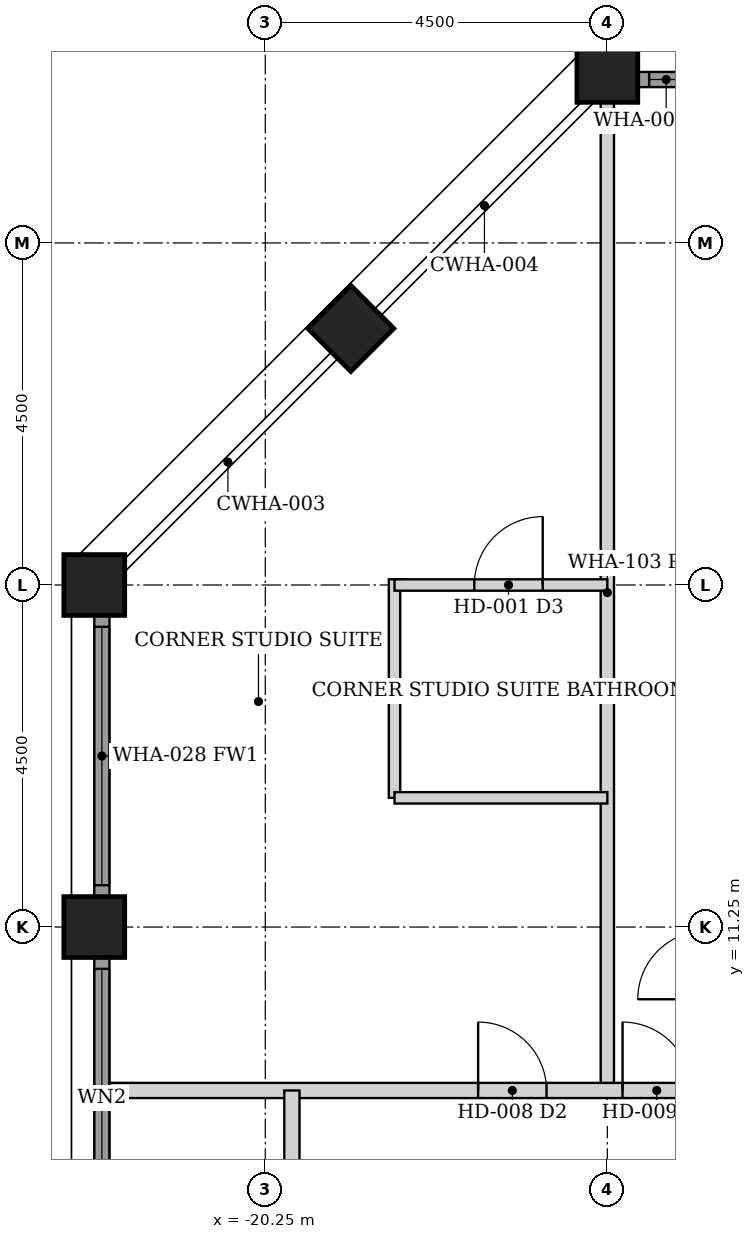
"""IFC4 building model, lengths in metres.
Left out: names, types, materials, properties, quantities, classifications, styles, units other than length and angle.
Written with IfcOpenShell. Run it as: python <this file> out.ifc"""

import sys

from ifc_helpers import new_model, si_unit, direction, frame, frame_2d, origin, origin_2d, place, context, subcontext, project, spatial, rectangle, hollow_rectangle, extrude, element, fill, save


model = new_model("IFC4")
c1 = context("Model", 3, precision=1e-05, world=origin(), true_north=direction((0.0, 1.0)))
c2 = subcontext(c1, "Body", "Model", "MODEL_VIEW")
j1 = project(units=[si_unit("LENGTHUNIT", "METRE"), si_unit("PLANEANGLEUNIT", "RADIAN")], contexts=[c1])
p1 = place(None, origin())
s1 = spatial("IfcSite", under=j1, at=p1, CompositionType="ELEMENT")
p2 = place(p1, origin())
s2 = spatial("IfcBuilding", under=s1, at=p2, CompositionType="ELEMENT")
p3 = place(p2, frame((0.0, 0.0, 150.8)))
s3 = spatial("IfcBuildingStorey", under=s2, at=p3, CompositionType="ELEMENT", Elevation=150.8)
for number, where, z_axis, x_axis in (
    (1, (-15.75, 22.5, 0.0), (0.0, 0.0, 1.0), (0.0, 1.0, 0.0)),
    (2, (-22.5, 11.25, 0.0), (0.0, 0.0, 1.0), (1.0, 0.0, 0.0)),
    (3, (-22.5, 15.75, 0.0), (0.0, 0.0, 1.0), (1.0, 0.0, 0.0)),
    (4, (-19.125, 19.125, 0.0), (0.0, 0.0, 1.0), (0.707, -0.707, 0.0)),
):
    element("IfcColumn", number, at=place(p3, frame(where, z_axis=z_axis, x_axis=x_axis)), inside=s3, PredefinedType="COLUMN", context=c2, shape_type="SweptSolid", body=[
        extrude(hollow_rectangle(XDim=0.8, YDim=0.8, WallThickness=0.05, at=origin_2d()), origin(), (0.0, 0.0, 1.0), 3.6),
    ])
p4 = place(p3, frame((-15.345, 22.4, 0.0), z_axis=(0.0, 0.0, 1.0), x_axis=(1.0, 0.0, 0.0)))
e5 = element("IfcWall", 5, at=p4, inside=s3, PredefinedType="SOLIDWALL", context=c2, shape_type="SweptSolid", body=[
    extrude(rectangle(XDim=3.69, YDim=0.2, at=frame_2d((1.845, 0.0))), origin(), (0.0, 0.0, 1.0), 2.479),
])
p5 = place(p4, frame((0.145, 0.0, 0.3)))
e6 = element("IfcOpeningElement", 6, at=p5, cuts=e5, PredefinedType="OPENING", context=c2, shape_type="SweptSolid", body=[
    extrude(rectangle(XDim=3.4, YDim=2.029, at=frame_2d((1.7, 1.015))), frame((0.0, 0.11, 0.0), z_axis=(0.0, -1.0, 0.0), x_axis=(1.0, 0.0, 0.0)), (0.0, 0.0, 1.0), 0.22),
])
p6 = place(p3, frame((-22.4, 7.155, 0.0), z_axis=(0.0, 0.0, 1.0), x_axis=(0.0, 1.0, 0.0)))
e7 = element("IfcWall", 7, at=p6, inside=s3, PredefinedType="SOLIDWALL", context=c2, shape_type="SweptSolid", body=[
    extrude(rectangle(XDim=3.69, YDim=0.2, at=frame_2d((1.845, 0.0))), origin(), (0.0, 0.0, 1.0), 2.479),
])
p7 = place(p6, frame((0.145, 0.0, 0.3)))
e8 = element("IfcOpeningElement", 8, at=p7, cuts=e7, PredefinedType="OPENING", context=c2, shape_type="SweptSolid", body=[
    extrude(rectangle(XDim=3.4, YDim=2.029, at=frame_2d((1.7, 1.015))), frame((0.0, 0.11, 0.0), z_axis=(0.0, -1.0, 0.0), x_axis=(1.0, 0.0, 0.0)), (0.0, 0.0, 1.0), 0.22),
])
p8 = place(p3, frame((-22.4, 11.655, 0.0), z_axis=(0.0, 0.0, 1.0), x_axis=(0.0, 1.0, 0.0)))
e9 = element("IfcWall", 9, at=p8, inside=s3, PredefinedType="SOLIDWALL", context=c2, shape_type="SweptSolid", body=[
    extrude(rectangle(XDim=3.69, YDim=0.2, at=frame_2d((1.845, 0.0))), origin(), (0.0, 0.0, 1.0), 2.479),
])
p9 = place(p8, frame((0.145, 0.0, 0.3)))
e10 = element("IfcOpeningElement", 10, at=p9, cuts=e9, PredefinedType="OPENING", context=c2, shape_type="SweptSolid", body=[
    extrude(rectangle(XDim=3.4, YDim=2.029, at=frame_2d((1.7, 1.015))), frame((0.0, 0.11, 0.0), z_axis=(0.0, -1.0, 0.0), x_axis=(1.0, 0.0, 0.0)), (0.0, 0.0, 1.0), 0.22),
])
p10 = place(p3, frame((-22.3, 9.1, 0.0), z_axis=(0.0, 0.0, 1.0), x_axis=(1.0, 0.0, 0.0)))
e11 = element("IfcWall", 11, at=p10, inside=s3, PredefinedType="PARTITIONING", context=c2, shape_type="SweptSolid", body=[
    extrude(rectangle(XDim=44.6, YDim=0.2, at=frame_2d((22.3, 0.0))), origin(), (0.0, 0.0, 1.0), 2.473),
])
p11 = place(p10, frame((6.75, 0.0, 0.0)))
e12 = element("IfcOpeningElement", 12, at=p11, cuts=e11, PredefinedType="OPENING", context=c2, shape_type="SweptSolid", body=[
    extrude(rectangle(XDim=0.9, YDim=2.1, at=frame_2d((0.45, 1.05))), frame((0.0, 0.11, 0.0), z_axis=(0.0, -1.0, 0.0), x_axis=(1.0, 0.0, 0.0)), (0.0, 0.0, 1.0), 0.22),
])
p12 = place(p10, frame((11.25, 0.0, 0.0)))
e13 = element("IfcOpeningElement", 13, at=p12, cuts=e11, PredefinedType="OPENING", context=c2, shape_type="SweptSolid", body=[
    extrude(rectangle(XDim=0.9, YDim=2.1, at=frame_2d((0.45, 1.05))), frame((0.0, 0.11, 0.0), z_axis=(0.0, -1.0, 0.0), x_axis=(1.0, 0.0, 0.0)), (0.0, 0.0, 1.0), 0.22),
])
p13 = place(p10, frame((23.45, 0.0, 0.0)))
e14 = element("IfcOpeningElement", 14, at=p13, cuts=e11, PredefinedType="OPENING", context=c2, shape_type="SweptSolid", body=[
    extrude(rectangle(XDim=0.9, YDim=2.1, at=frame_2d((0.45, 1.05))), frame((0.0, 0.11, 0.0), z_axis=(0.0, -1.0, 0.0), x_axis=(1.0, 0.0, 0.0)), (0.0, 0.0, 1.0), 0.22),
])
p14 = place(p10, frame((32.45, 0.0, 0.0)))
e15 = element("IfcOpeningElement", 15, at=p14, cuts=e11, PredefinedType="OPENING", context=c2, shape_type="SweptSolid", body=[
    extrude(rectangle(XDim=0.9, YDim=2.1, at=frame_2d((0.45, 1.05))), frame((0.0, 0.11, 0.0), z_axis=(0.0, -1.0, 0.0), x_axis=(1.0, 0.0, 0.0)), (0.0, 0.0, 1.0), 0.22),
])
p15 = place(p10, frame((33.75, 0.0, 0.0)))
e16 = element("IfcOpeningElement", 16, at=p15, cuts=e11, PredefinedType="OPENING", context=c2, shape_type="SweptSolid", body=[
    extrude(rectangle(XDim=0.9, YDim=2.1, at=frame_2d((0.45, 1.05))), frame((0.0, 0.11, 0.0), z_axis=(0.0, -1.0, 0.0), x_axis=(1.0, 0.0, 0.0)), (0.0, 0.0, 1.0), 0.22),
])
p16 = place(p10, frame((38.85, 0.0, 0.0)))
e17 = element("IfcOpeningElement", 17, at=p16, cuts=e11, PredefinedType="OPENING", context=c2, shape_type="SweptSolid", body=[
    extrude(rectangle(XDim=0.9, YDim=2.1, at=frame_2d((0.45, 1.05))), frame((0.0, 0.11, 0.0), z_axis=(0.0, -1.0, 0.0), x_axis=(1.0, 0.0, 0.0)), (0.0, 0.0, 1.0), 0.22),
])
p17 = place(p10, frame((4.85, 0.0, 0.0)))
e18 = element("IfcOpeningElement", 18, at=p17, cuts=e11, PredefinedType="OPENING", context=c2, shape_type="SweptSolid", body=[
    extrude(rectangle(XDim=0.9, YDim=2.1, at=frame_2d((0.45, 1.05))), frame((0.0, 0.11, 0.0), z_axis=(0.0, -1.0, 0.0), x_axis=(1.0, 0.0, 0.0)), (0.0, 0.0, 1.0), 0.22),
])
p18 = place(p3, frame((-19.9, -9.1, 0.0), z_axis=(0.0, 0.0, 1.0), x_axis=(0.0, 1.0, 0.0)))
e19 = element("IfcWall", 19, at=p18, inside=s3, PredefinedType="PARTITIONING", context=c2, shape_type="SweptSolid", body=[
    extrude(rectangle(XDim=18.2, YDim=0.2, at=frame_2d((9.1, 0.0))), origin(), (0.0, 0.0, 1.0), 2.473),
])
p19 = place(p18, frame((8.425, 0.0, 0.0)))
e20 = element("IfcOpeningElement", 20, at=p19, cuts=e19, PredefinedType="OPENING", context=c2, shape_type="SweptSolid", body=[
    extrude(rectangle(XDim=1.35, YDim=2.1, at=frame_2d((0.675, 1.05))), frame((0.0, 0.11, 0.0), z_axis=(0.0, -1.0, 0.0), x_axis=(1.0, 0.0, 0.0)), (0.0, 0.0, 1.0), 0.22),
])
p20 = place(p3, frame((-15.75, 9.2, 0.0), z_axis=(0.0, 0.0, 1.0), x_axis=(0.0, 1.0, 0.0)))
e21 = element("IfcWall", 21, at=p20, inside=s3, PredefinedType="PARTITIONING", context=c2, shape_type="SweptSolid", body=[
    extrude(rectangle(XDim=12.9, YDim=0.175, at=frame_2d((6.45, 0.0))), origin(), (0.0, 0.0, 1.0), 2.473),
])
p21 = place(p3, frame((-18.55, 12.95, 0.0), z_axis=(0.0, 0.0, 1.0), x_axis=(0.0, 1.0, 0.0)))
e22 = element("IfcWall", 22, at=p21, inside=s3, PredefinedType="PARTITIONING", context=c2, shape_type="SweptSolid", body=[
    extrude(rectangle(XDim=2.875, YDim=0.15, at=frame_2d((1.438, 0.0))), origin(), (0.0, 0.0, 1.0), 2.473),
])
p22 = place(p3, frame((-18.55, 12.95, 0.0), z_axis=(0.0, 0.0, 1.0), x_axis=(1.0, 0.0, 0.0)))
e23 = element("IfcWall", 23, at=p22, inside=s3, PredefinedType="PARTITIONING", context=c2, shape_type="SweptSolid", body=[
    extrude(rectangle(XDim=2.8, YDim=0.15, at=frame_2d((1.4, 0.0))), origin(), (0.0, 0.0, 1.0), 2.473),
])
p23 = place(p3, frame((-18.55, 15.75, 0.0), z_axis=(0.0, 0.0, 1.0), x_axis=(1.0, 0.0, 0.0)))
e24 = element("IfcWall", 24, at=p23, inside=s3, PredefinedType="PARTITIONING", context=c2, shape_type="SweptSolid", body=[
    extrude(rectangle(XDim=2.8, YDim=0.15, at=frame_2d((1.4, 0.0))), origin(), (0.0, 0.0, 1.0), 2.473),
])
p24 = place(p23, frame((1.05, 0.0, 0.0)))
e25 = element("IfcOpeningElement", 25, at=p24, cuts=e24, PredefinedType="OPENING", context=c2, shape_type="SweptSolid", body=[
    extrude(rectangle(XDim=0.9, YDim=2.1, at=frame_2d((0.45, 1.05))), frame((0.0, 0.085, 0.0), z_axis=(0.0, -1.0, 0.0), x_axis=(1.0, 0.0, 0.0)), (0.0, 0.0, 1.0), 0.17),
])
p25 = place(p5, origin())
e26 = element("IfcWindow", 26, at=p25, inside=s3, PartitioningType="SINGLE_PANEL", PredefinedType="WINDOW", context=c2, shape_type="SweptSolid", body=[
    extrude(rectangle(XDim=3.4, YDim=2.029, at=frame_2d((1.7, 1.015))), frame((0.0, 0.03, 0.0), z_axis=(0.0, -1.0, 0.0), x_axis=(1.0, 0.0, 0.0)), (0.0, 0.0, 1.0), 0.06),
])
fill(e6, e26)
p26 = place(p7, origin())
e27 = element("IfcWindow", 27, at=p26, inside=s3, PartitioningType="SINGLE_PANEL", PredefinedType="WINDOW", context=c2, shape_type="SweptSolid", body=[
    extrude(rectangle(XDim=3.4, YDim=2.029, at=frame_2d((1.7, 1.015))), frame((0.0, 0.03, 0.0), z_axis=(0.0, -1.0, 0.0), x_axis=(1.0, 0.0, 0.0)), (0.0, 0.0, 1.0), 0.06),
])
fill(e8, e27)
p27 = place(p9, origin())
e28 = element("IfcWindow", 28, at=p27, inside=s3, PartitioningType="SINGLE_PANEL", PredefinedType="WINDOW", context=c2, shape_type="SweptSolid", body=[
    extrude(rectangle(XDim=3.4, YDim=2.029, at=frame_2d((1.7, 1.015))), frame((0.0, 0.03, 0.0), z_axis=(0.0, -1.0, 0.0), x_axis=(1.0, 0.0, 0.0)), (0.0, 0.0, 1.0), 0.06),
])
fill(e10, e28)
p28 = place(p11, origin())
e29 = element("IfcDoor", 29, at=p28, inside=s3, OperationType="SINGLE_SWING_LEFT", PredefinedType="DOOR", context=c2, shape_type="SweptSolid", body=[
    extrude(rectangle(XDim=0.9, YDim=2.1, at=frame_2d((0.45, 1.05))), frame((0.0, 0.025, 0.0), z_axis=(0.0, -1.0, 0.0), x_axis=(1.0, 0.0, 0.0)), (0.0, 0.0, 1.0), 0.05),
])
fill(e12, e29)
p29 = place(p17, origin())
e30 = element("IfcDoor", 30, at=p29, inside=s3, OperationType="SINGLE_SWING_LEFT", PredefinedType="DOOR", context=c2, shape_type="SweptSolid", body=[
    extrude(rectangle(XDim=0.9, YDim=2.1, at=frame_2d((0.45, 1.05))), frame((0.0, 0.025, 0.0), z_axis=(0.0, -1.0, 0.0), x_axis=(1.0, 0.0, 0.0)), (0.0, 0.0, 1.0), 0.05),
])
fill(e18, e30)
p30 = place(p24, origin())
e31 = element("IfcDoor", 31, at=p30, inside=s3, OperationType="SINGLE_SWING_RIGHT", PredefinedType="DOOR", context=c2, shape_type="SweptSolid", body=[
    extrude(rectangle(XDim=0.9, YDim=2.1, at=frame_2d((0.45, 1.05))), frame((0.0, 0.025, 0.0), z_axis=(0.0, -1.0, 0.0), x_axis=(1.0, 0.0, 0.0)), (0.0, 0.0, 1.0), 0.05),
])
fill(e25, e31)
save(model, sys.argv[1])
